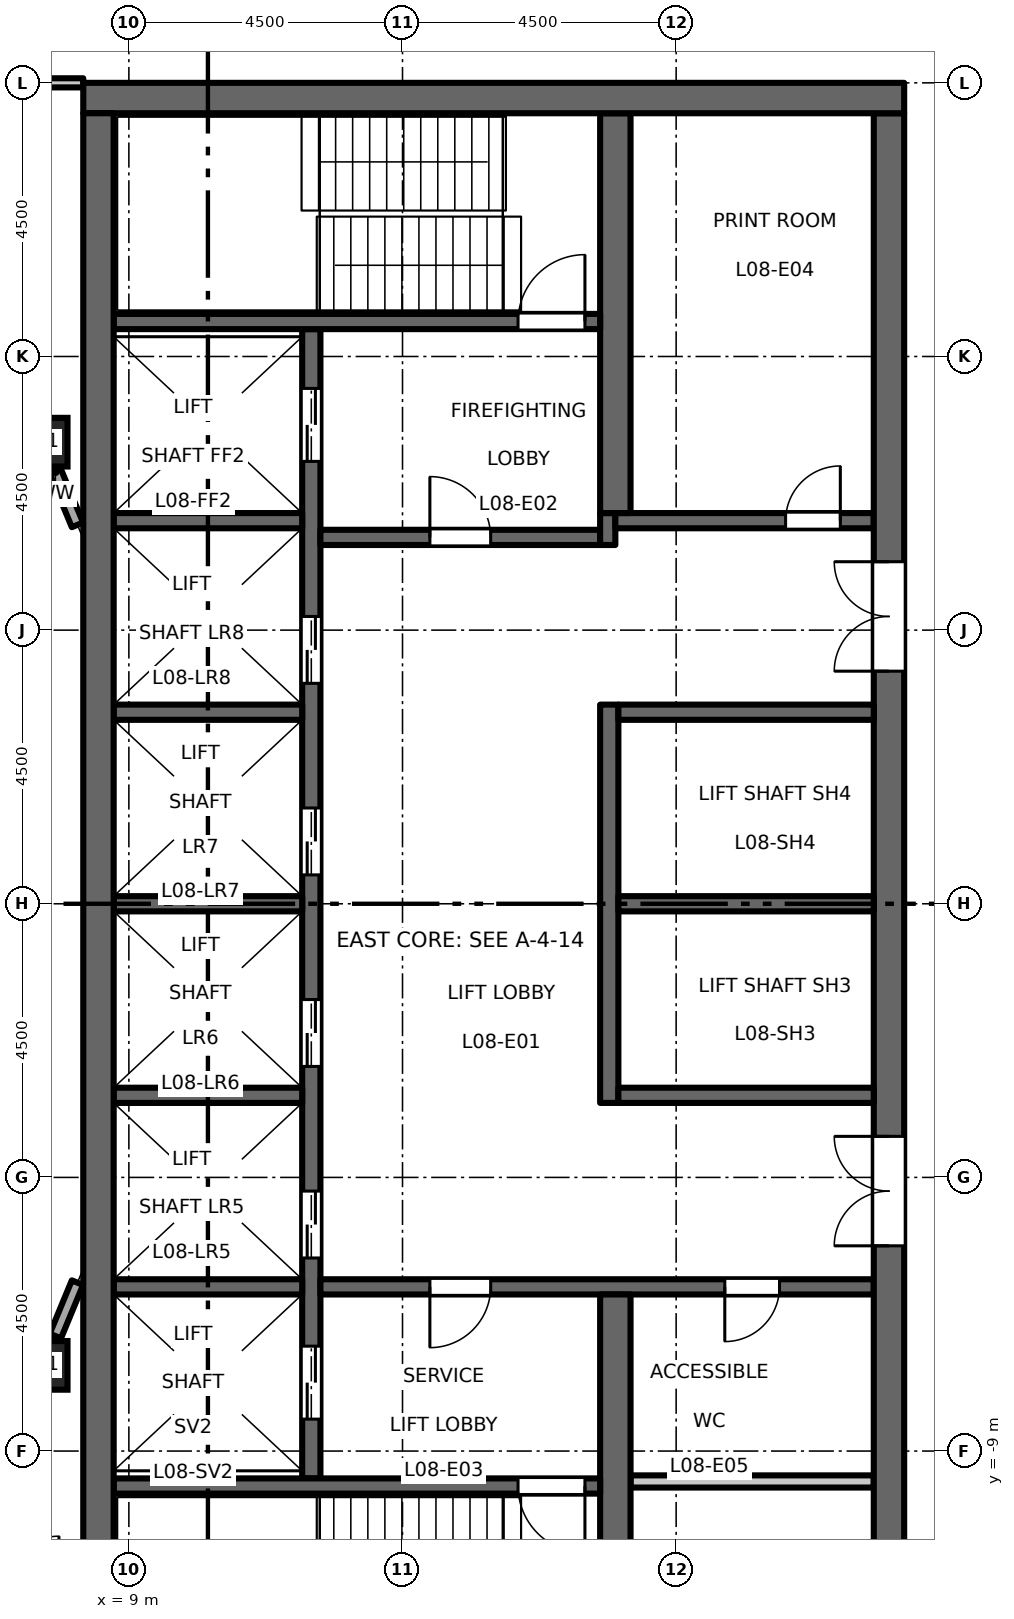
"""IFC4 building model, lengths in metres.
Left out: names, types, materials, properties, quantities, classifications, styles, units other than length and angle.
Written with IfcOpenShell. Run it as: python <this file> out.ifc"""

import sys

from ifc_helpers import new_model, si_unit, direction, frame, frame_2d, origin, origin_2d, place, context, subcontext, project, spatial, rectangle, hollow_rectangle, extrude, element, fill, save


model = new_model("IFC4")
c1 = context("Model", 3, precision=1e-05, world=origin(), true_north=direction((0.0, 1.0)))
c2 = subcontext(c1, "Body", "Model", "MODEL_VIEW")
j1 = project(units=[si_unit("LENGTHUNIT", "METRE"), si_unit("PLANEANGLEUNIT", "RADIAN")], contexts=[c1])
p1 = place(None, origin())
s1 = spatial("IfcSite", under=j1, at=p1, CompositionType="ELEMENT")
p2 = place(p1, origin())
s2 = spatial("IfcBuilding", under=s1, at=p2, CompositionType="ELEMENT")
p3 = place(p2, frame((0.0, 0.0, 40.2)))
s3 = spatial("IfcBuildingStorey", under=s2, at=p3, CompositionType="ELEMENT", Elevation=40.2)
for number, where, z_axis, x_axis in (
    (1, (7.591, -7.591, 0.0), (0.0, 0.0, 1.0), (1.0, 0.0, 0.0)),
    (2, (7.591, 7.591, 0.0), (0.0, 0.0, 1.0), (1.0, 0.0, 0.0)),
):
    element("IfcColumn", number, at=place(p3, frame(where, z_axis=z_axis, x_axis=x_axis)), inside=s3, PredefinedType="COLUMN", context=c2, shape_type="SweptSolid", body=[
        extrude(hollow_rectangle(XDim=0.8, YDim=0.8, WallThickness=0.05, at=origin_2d()), origin(), (0.0, 0.0, 1.0), 4.5),
    ])
p4 = place(p3, frame((12.0, -9.45, 0.0), z_axis=(0.0, 0.0, 1.0), x_axis=(0.0, 1.0, 0.0)))
e3 = element("IfcWall", 3, at=p4, inside=s3, PredefinedType="SHEAR", context=c2, shape_type="SweptSolid", body=[
    extrude(rectangle(XDim=18.9, YDim=0.3, at=frame_2d((9.45, 0.0))), origin(), (0.0, 0.0, 1.0), 4.35),
])
p5 = place(p4, frame((3.625, 0.0, 0.0)))
e4 = element("IfcOpeningElement", 4, at=p5, cuts=e3, PredefinedType="OPENING", context=c2, shape_type="SweptSolid", body=[
    extrude(rectangle(XDim=1.1, YDim=2.1, at=frame_2d((0.55, 1.05))), frame((0.0, 0.16, 0.0), z_axis=(0.0, -1.0, 0.0), x_axis=(1.0, 0.0, 0.0)), (0.0, 0.0, 1.0), 0.32),
])
p6 = place(p4, frame((6.775, 0.0, 0.0)))
e5 = element("IfcOpeningElement", 5, at=p6, cuts=e3, PredefinedType="OPENING", context=c2, shape_type="SweptSolid", body=[
    extrude(rectangle(XDim=1.1, YDim=2.1, at=frame_2d((0.55, 1.05))), frame((0.0, 0.16, 0.0), z_axis=(0.0, -1.0, 0.0), x_axis=(1.0, 0.0, 0.0)), (0.0, 0.0, 1.0), 0.32),
])
p7 = place(p4, frame((9.925, 0.0, 0.0)))
e6 = element("IfcOpeningElement", 6, at=p7, cuts=e3, PredefinedType="OPENING", context=c2, shape_type="SweptSolid", body=[
    extrude(rectangle(XDim=1.1, YDim=2.1, at=frame_2d((0.55, 1.05))), frame((0.0, 0.16, 0.0), z_axis=(0.0, -1.0, 0.0), x_axis=(1.0, 0.0, 0.0)), (0.0, 0.0, 1.0), 0.32),
])
p8 = place(p4, frame((13.075, 0.0, 0.0)))
e7 = element("IfcOpeningElement", 7, at=p8, cuts=e3, PredefinedType="OPENING", context=c2, shape_type="SweptSolid", body=[
    extrude(rectangle(XDim=1.1, YDim=2.1, at=frame_2d((0.55, 1.05))), frame((0.0, 0.16, 0.0), z_axis=(0.0, -1.0, 0.0), x_axis=(1.0, 0.0, 0.0)), (0.0, 0.0, 1.0), 0.32),
])
p9 = place(p4, frame((16.725, 0.0, 0.0)))
e8 = element("IfcOpeningElement", 8, at=p9, cuts=e3, PredefinedType="OPENING", context=c2, shape_type="SweptSolid", body=[
    extrude(rectangle(XDim=1.2, YDim=2.1, at=frame_2d((0.6, 1.05))), frame((0.0, 0.16, 0.0), z_axis=(0.0, -1.0, 0.0), x_axis=(1.0, 0.0, 0.0)), (0.0, 0.0, 1.0), 0.32),
])
p10 = place(p4, frame((0.975, 0.0, 0.0)))
e9 = element("IfcOpeningElement", 9, at=p10, cuts=e3, PredefinedType="OPENING", context=c2, shape_type="SweptSolid", body=[
    extrude(rectangle(XDim=1.2, YDim=2.1, at=frame_2d((0.6, 1.05))), frame((0.0, 0.16, 0.0), z_axis=(0.0, -1.0, 0.0), x_axis=(1.0, 0.0, 0.0)), (0.0, 0.0, 1.0), 0.32),
])
p11 = place(p3, frame((12.15, 6.025, 0.0), z_axis=(0.0, 0.0, 1.0), x_axis=(1.0, 0.0, 0.0)))
e10 = element("IfcWall", 10, at=p11, inside=s3, PredefinedType="SHEAR", context=c2, shape_type="SweptSolid", body=[
    extrude(rectangle(XDim=4.6, YDim=0.25, at=frame_2d((2.3, 0.0))), origin(), (0.0, 0.0, 1.0), 4.35),
])
p12 = place(p11, frame((1.8, 0.0, 0.0)))
e11 = element("IfcOpeningElement", 11, at=p12, cuts=e10, PredefinedType="OPENING", context=c2, shape_type="SweptSolid", body=[
    extrude(rectangle(XDim=1.0, YDim=2.1, at=frame_2d((0.5, 1.05))), frame((0.0, 0.135, 0.0), z_axis=(0.0, -1.0, 0.0), x_axis=(1.0, 0.0, 0.0)), (0.0, 0.0, 1.0), 0.27),
])
p13 = place(p3, frame((16.875, 5.9, 0.0), z_axis=(0.0, 0.0, 1.0), x_axis=(0.0, 1.0, 0.0)))
e12 = element("IfcWall", 12, at=p13, inside=s3, PredefinedType="SHEAR", context=c2, shape_type="SweptSolid", body=[
    extrude(rectangle(XDim=0.525, YDim=0.25, at=frame_2d((0.263, 0.0))), origin(), (0.0, 0.0, 1.0), 4.35),
])
p14 = place(p3, frame((17.0, 6.3, 0.0), z_axis=(0.0, 0.0, 1.0), x_axis=(1.0, 0.0, 0.0)))
e13 = element("IfcWall", 13, at=p14, inside=s3, PredefinedType="SHEAR", context=c2, shape_type="SweptSolid", body=[
    extrude(rectangle(XDim=4.25, YDim=0.25, at=frame_2d((2.125, 0.0))), origin(), (0.0, 0.0, 1.0), 4.35),
])
p15 = place(p14, frame((2.8, 0.0, 0.0)))
e14 = element("IfcOpeningElement", 14, at=p15, cuts=e13, PredefinedType="OPENING", context=c2, shape_type="SweptSolid", body=[
    extrude(rectangle(XDim=0.9, YDim=2.1, at=frame_2d((0.45, 1.05))), frame((0.0, 0.135, 0.0), z_axis=(0.0, -1.0, 0.0), x_axis=(1.0, 0.0, 0.0)), (0.0, 0.0, 1.0), 0.27),
])
p16 = place(p3, frame((12.15, -6.3, 0.0), z_axis=(0.0, 0.0, 1.0), x_axis=(1.0, 0.0, 0.0)))
e15 = element("IfcWall", 15, at=p16, inside=s3, PredefinedType="SHEAR", context=c2, shape_type="SweptSolid", body=[
    extrude(rectangle(XDim=9.1, YDim=0.25, at=frame_2d((4.55, 0.0))), origin(), (0.0, 0.0, 1.0), 4.35),
])
p17 = place(p16, frame((1.8, 0.0, 0.0)))
e16 = element("IfcOpeningElement", 16, at=p17, cuts=e15, PredefinedType="OPENING", context=c2, shape_type="SweptSolid", body=[
    extrude(rectangle(XDim=1.0, YDim=2.1, at=frame_2d((0.5, 1.05))), frame((0.0, 0.135, 0.0), z_axis=(0.0, -1.0, 0.0), x_axis=(1.0, 0.0, 0.0)), (0.0, 0.0, 1.0), 0.27),
])
p18 = place(p16, frame((6.65, 0.0, 0.0)))
e17 = element("IfcOpeningElement", 17, at=p18, cuts=e15, PredefinedType="OPENING", context=c2, shape_type="SweptSolid", body=[
    extrude(rectangle(XDim=0.9, YDim=2.1, at=frame_2d((0.45, 1.05))), frame((0.0, 0.135, 0.0), z_axis=(0.0, -1.0, 0.0), x_axis=(1.0, 0.0, 0.0)), (0.0, 0.0, 1.0), 0.27),
])
p19 = place(p3, frame((21.5, -13.0, 0.0), z_axis=(0.0, 0.0, 1.0), x_axis=(0.0, 1.0, 0.0)))
e18 = element("IfcWall", 18, at=p19, inside=s3, PredefinedType="SHEAR", context=c2, shape_type="SweptSolid", body=[
    extrude(rectangle(XDim=26.0, YDim=0.5, at=frame_2d((13.0, 0.0))), origin(), (0.0, 0.0, 1.0), 4.35),
])
p20 = place(p19, frame((16.825, 0.0, 0.0)))
e19 = element("IfcOpeningElement", 19, at=p20, cuts=e18, PredefinedType="OPENING", context=c2, shape_type="SweptSolid", body=[
    extrude(rectangle(XDim=1.8, YDim=2.1, at=frame_2d((0.9, 1.05))), frame((0.0, 0.26, 0.0), z_axis=(0.0, -1.0, 0.0), x_axis=(1.0, 0.0, 0.0)), (0.0, 0.0, 1.0), 0.52),
])
p21 = place(p19, frame((7.375, 0.0, 0.0)))
e20 = element("IfcOpeningElement", 20, at=p21, cuts=e18, PredefinedType="OPENING", context=c2, shape_type="SweptSolid", body=[
    extrude(rectangle(XDim=1.8, YDim=2.1, at=frame_2d((0.9, 1.05))), frame((0.0, 0.26, 0.0), z_axis=(0.0, -1.0, 0.0), x_axis=(1.0, 0.0, 0.0)), (0.0, 0.0, 1.0), 0.52),
])
p22 = place(p19, frame((1.3, 0.0, 0.0)))
e21 = element("IfcOpeningElement", 21, at=p22, cuts=e18, PredefinedType="OPENING", context=c2, shape_type="SweptSolid", body=[
    extrude(rectangle(XDim=0.9, YDim=2.1, at=frame_2d((0.45, 1.05))), frame((0.0, 0.26, 0.0), z_axis=(0.0, -1.0, 0.0), x_axis=(1.0, 0.0, 0.0)), (0.0, 0.0, 1.0), 0.52),
])
p23 = place(p3, frame((17.25, -9.5, 0.0), z_axis=(0.0, 0.0, 1.0), x_axis=(1.0, 0.0, 0.0)))
e22 = element("IfcWall", 22, at=p23, inside=s3, PredefinedType="PARTITIONING", context=c2, shape_type="SweptSolid", body=[
    extrude(rectangle(XDim=4.0, YDim=0.2, at=frame_2d((2.0, 0.0))), origin(), (0.0, 0.0, 1.0), 4.35),
])
p24 = place(p3, frame((16.9, -3.275, 0.0), z_axis=(0.0, 0.0, 1.0), x_axis=(0.0, 1.0, 0.0)))
e23 = element("IfcWall", 23, at=p24, inside=s3, PredefinedType="SHEAR", context=c2, shape_type="SweptSolid", body=[
    extrude(rectangle(XDim=6.55, YDim=0.3, at=frame_2d((3.275, 0.0))), origin(), (0.0, 0.0, 1.0), 4.35),
])
for number, where, z_axis, x_axis in (
    (24, (17.05, 0.0, 0.0), (0.0, 0.0, 1.0), (1.0, 0.0, 0.0)),
    (25, (17.05, 3.15, 0.0), (0.0, 0.0, 1.0), (1.0, 0.0, 0.0)),
    (26, (17.05, -3.15, 0.0), (0.0, 0.0, 1.0), (1.0, 0.0, 0.0)),
):
    element("IfcWall", number, at=place(p3, frame(where, z_axis=z_axis, x_axis=x_axis)), inside=s3, PredefinedType="SHEAR", context=c2, shape_type="SweptSolid", body=[
        extrude(rectangle(XDim=4.2, YDim=0.25, at=frame_2d((2.1, 0.0))), origin(), (0.0, 0.0, 1.0), 4.35),
    ])
for number, where, z_axis, x_axis in (
    (27, (17.0, 6.425, 0.0), (0.0, 0.0, 1.0), (0.0, 1.0, 0.0)),
    (28, (17.0, -13.0, 0.0), (0.0, 0.0, 1.0), (0.0, 1.0, 0.0)),
):
    element("IfcWall", number, at=place(p3, frame(where, z_axis=z_axis, x_axis=x_axis)), inside=s3, PredefinedType="SHEAR", context=c2, shape_type="SweptSolid", body=[
        extrude(rectangle(XDim=6.575, YDim=0.5, at=frame_2d((3.288, 0.0))), origin(), (0.0, 0.0, 1.0), 4.35),
    ])
for number, where, z_axis, x_axis in (
    (29, (8.75, 0.0, 0.0), (0.0, 0.0, 1.0), (1.0, 0.0, 0.0)),
    (30, (8.75, 3.15, 0.0), (0.0, 0.0, 1.0), (1.0, 0.0, 0.0)),
    (31, (8.75, 6.3, 0.0), (0.0, 0.0, 1.0), (1.0, 0.0, 0.0)),
    (32, (8.75, -3.15, 0.0), (0.0, 0.0, 1.0), (1.0, 0.0, 0.0)),
    (33, (8.75, -6.3, 0.0), (0.0, 0.0, 1.0), (1.0, 0.0, 0.0)),
):
    element("IfcWall", number, at=place(p3, frame(where, z_axis=z_axis, x_axis=x_axis)), inside=s3, PredefinedType="SHEAR", context=c2, shape_type="SweptSolid", body=[
        extrude(rectangle(XDim=3.1, YDim=0.25, at=frame_2d((1.55, 0.0))), origin(), (0.0, 0.0, 1.0), 4.35),
    ])
p25 = place(p3, frame((8.75, 9.575, 0.0), z_axis=(0.0, 0.0, 1.0), x_axis=(1.0, 0.0, 0.0)))
e34 = element("IfcWall", 34, at=p25, inside=s3, PredefinedType="SHEAR", context=c2, shape_type="SweptSolid", body=[
    extrude(rectangle(XDim=8.0, YDim=0.25, at=frame_2d((4.0, 0.0))), origin(), (0.0, 0.0, 1.0), 4.35),
])
p26 = place(p25, frame((6.65, 0.0, 0.0)))
e35 = element("IfcOpeningElement", 35, at=p26, cuts=e34, PredefinedType="OPENING", context=c2, shape_type="SweptSolid", body=[
    extrude(rectangle(XDim=1.1, YDim=2.1, at=frame_2d((0.55, 1.05))), frame((0.0, 0.135, 0.0), z_axis=(0.0, -1.0, 0.0), x_axis=(1.0, 0.0, 0.0)), (0.0, 0.0, 1.0), 0.27),
])
p27 = place(p3, frame((8.75, -9.575, 0.0), z_axis=(0.0, 0.0, 1.0), x_axis=(1.0, 0.0, 0.0)))
e36 = element("IfcWall", 36, at=p27, inside=s3, PredefinedType="SHEAR", context=c2, shape_type="SweptSolid", body=[
    extrude(rectangle(XDim=8.0, YDim=0.25, at=frame_2d((4.0, 0.0))), origin(), (0.0, 0.0, 1.0), 4.35),
])
p28 = place(p27, frame((6.65, 0.0, 0.0)))
e37 = element("IfcOpeningElement", 37, at=p28, cuts=e36, PredefinedType="OPENING", context=c2, shape_type="SweptSolid", body=[
    extrude(rectangle(XDim=1.1, YDim=2.1, at=frame_2d((0.55, 1.05))), frame((0.0, 0.135, 0.0), z_axis=(0.0, -1.0, 0.0), x_axis=(1.0, 0.0, 0.0)), (0.0, 0.0, 1.0), 0.27),
])
p29 = place(p3, frame((8.25, 13.25, 0.0), z_axis=(0.0, 0.0, 1.0), x_axis=(1.0, 0.0, 0.0)))
e38 = element("IfcWall", 38, at=p29, inside=s3, PredefinedType="SHEAR", context=c2, shape_type="SweptSolid", body=[
    extrude(rectangle(XDim=13.5, YDim=0.5, at=frame_2d((6.75, 0.0))), origin(), (0.0, 0.0, 1.0), 4.35),
])
p30 = place(p3, frame((8.5, -13.0, 0.0), z_axis=(0.0, 0.0, 1.0), x_axis=(0.0, 1.0, 0.0)))
e39 = element("IfcWall", 39, at=p30, inside=s3, PredefinedType="SHEAR", context=c2, shape_type="SweptSolid", body=[
    extrude(rectangle(XDim=26.0, YDim=0.5, at=frame_2d((13.0, 0.0))), origin(), (0.0, 0.0, 1.0), 4.35),
])
for number, where, z_axis, x_axis in (
    (40, (7.791, -7.108, 0.0), (0.0, 0.0, 1.0), (0.383, 0.924, 0.0)),
    (41, (8.154, 6.231, 0.0), (0.0, 0.0, 1.0), (-0.383, 0.924, 0.0)),
):
    element("IfcWall", number, at=place(p3, frame(where, z_axis=z_axis, x_axis=x_axis)), inside=s3, PredefinedType="STANDARD", context=c2, shape_type="SweptSolid", body=[
        extrude(rectangle(XDim=0.949, YDim=0.2, at=frame_2d((0.475, 0.0))), origin(), (0.0, 0.0, 1.0), 3.73),
    ])
p31 = place(p3, frame((-8.25, 13.5, 0.0), z_axis=(0.0, 0.0, 1.0), x_axis=(1.0, 0.0, 0.0)))
e42 = element("IfcWall", 42, at=p31, inside=s3, PredefinedType="PARTITIONING", context=c2, shape_type="SweptSolid", body=[
    extrude(rectangle(XDim=16.5, YDim=0.15, at=frame_2d((8.25, 0.0))), origin(), (0.0, 0.0, 1.0), 3.85),
])
p32 = place(p31, frame((0.65, 0.0, 0.0)))
e43 = element("IfcOpeningElement", 43, at=p32, cuts=e42, PredefinedType="OPENING", context=c2, shape_type="SweptSolid", body=[
    extrude(rectangle(XDim=1.0, YDim=2.1, at=frame_2d((0.5, 1.05))), frame((0.0, 0.085, 0.0), z_axis=(0.0, -1.0, 0.0), x_axis=(1.0, 0.0, 0.0)), (0.0, 0.0, 1.0), 0.17),
])
p33 = place(p12, origin())
e44 = element("IfcDoor", 44, at=p33, inside=s3, OperationType="SINGLE_SWING_RIGHT", PredefinedType="DOOR", context=c2, shape_type="SweptSolid", body=[
    extrude(rectangle(XDim=1.0, YDim=2.1, at=frame_2d((0.5, 1.05))), frame((0.0, 0.025, 0.0), z_axis=(0.0, -1.0, 0.0), x_axis=(1.0, 0.0, 0.0)), (0.0, 0.0, 1.0), 0.05),
])
fill(e11, e44)
p34 = place(p17, origin())
e45 = element("IfcDoor", 45, at=p34, inside=s3, OperationType="SINGLE_SWING_LEFT", PredefinedType="DOOR", context=c2, shape_type="SweptSolid", body=[
    extrude(rectangle(XDim=1.0, YDim=2.1, at=frame_2d((0.5, 1.05))), frame((0.0, 0.025, 0.0), z_axis=(0.0, -1.0, 0.0), x_axis=(1.0, 0.0, 0.0)), (0.0, 0.0, 1.0), 0.05),
])
fill(e16, e45)
p35 = place(p26, origin())
e46 = element("IfcDoor", 46, at=p35, inside=s3, OperationType="SINGLE_SWING_LEFT", PredefinedType="DOOR", context=c2, shape_type="SweptSolid", body=[
    extrude(rectangle(XDim=1.1, YDim=2.1, at=frame_2d((0.55, 1.05))), frame((0.0, 0.025, 0.0), z_axis=(0.0, -1.0, 0.0), x_axis=(1.0, 0.0, 0.0)), (0.0, 0.0, 1.0), 0.05),
])
fill(e35, e46)
p36 = place(p28, origin())
e47 = element("IfcDoor", 47, at=p36, inside=s3, OperationType="SINGLE_SWING_RIGHT", PredefinedType="DOOR", context=c2, shape_type="SweptSolid", body=[
    extrude(rectangle(XDim=1.1, YDim=2.1, at=frame_2d((0.55, 1.05))), frame((0.0, 0.025, 0.0), z_axis=(0.0, -1.0, 0.0), x_axis=(1.0, 0.0, 0.0)), (0.0, 0.0, 1.0), 0.05),
])
fill(e37, e47)
p37 = place(p20, origin())
e48 = element("IfcDoor", 48, at=p37, inside=s3, OperationType="DOUBLE_DOOR_DOUBLE_SWING", PredefinedType="DOOR", context=c2, shape_type="SweptSolid", body=[
    extrude(rectangle(XDim=1.8, YDim=2.1, at=frame_2d((0.9, 1.05))), frame((0.0, 0.025, 0.0), z_axis=(0.0, -1.0, 0.0), x_axis=(1.0, 0.0, 0.0)), (0.0, 0.0, 1.0), 0.05),
])
fill(e19, e48)
p38 = place(p21, origin())
e49 = element("IfcDoor", 49, at=p38, inside=s3, OperationType="DOUBLE_DOOR_DOUBLE_SWING", PredefinedType="DOOR", context=c2, shape_type="SweptSolid", body=[
    extrude(rectangle(XDim=1.8, YDim=2.1, at=frame_2d((0.9, 1.05))), frame((0.0, 0.025, 0.0), z_axis=(0.0, -1.0, 0.0), x_axis=(1.0, 0.0, 0.0)), (0.0, 0.0, 1.0), 0.05),
])
fill(e20, e49)
p39 = place(p5, origin())
e50 = element("IfcDoor", 50, at=p39, inside=s3, OperationType="DOUBLE_DOOR_SLIDING", PredefinedType="DOOR", context=c2, shape_type="SweptSolid", body=[
    extrude(rectangle(XDim=1.1, YDim=2.1, at=frame_2d((0.55, 1.05))), frame((0.0, 0.025, 0.0), z_axis=(0.0, -1.0, 0.0), x_axis=(1.0, 0.0, 0.0)), (0.0, 0.0, 1.0), 0.05),
])
fill(e4, e50)
p40 = place(p6, origin())
e51 = element("IfcDoor", 51, at=p40, inside=s3, OperationType="DOUBLE_DOOR_SLIDING", PredefinedType="DOOR", context=c2, shape_type="SweptSolid", body=[
    extrude(rectangle(XDim=1.1, YDim=2.1, at=frame_2d((0.55, 1.05))), frame((0.0, 0.025, 0.0), z_axis=(0.0, -1.0, 0.0), x_axis=(1.0, 0.0, 0.0)), (0.0, 0.0, 1.0), 0.05),
])
fill(e5, e51)
p41 = place(p7, origin())
e52 = element("IfcDoor", 52, at=p41, inside=s3, OperationType="DOUBLE_DOOR_SLIDING", PredefinedType="DOOR", context=c2, shape_type="SweptSolid", body=[
    extrude(rectangle(XDim=1.1, YDim=2.1, at=frame_2d((0.55, 1.05))), frame((0.0, 0.025, 0.0), z_axis=(0.0, -1.0, 0.0), x_axis=(1.0, 0.0, 0.0)), (0.0, 0.0, 1.0), 0.05),
])
fill(e6, e52)
p42 = place(p8, origin())
e53 = element("IfcDoor", 53, at=p42, inside=s3, OperationType="DOUBLE_DOOR_SLIDING", PredefinedType="DOOR", context=c2, shape_type="SweptSolid", body=[
    extrude(rectangle(XDim=1.1, YDim=2.1, at=frame_2d((0.55, 1.05))), frame((0.0, 0.025, 0.0), z_axis=(0.0, -1.0, 0.0), x_axis=(1.0, 0.0, 0.0)), (0.0, 0.0, 1.0), 0.05),
])
fill(e7, e53)
p43 = place(p9, origin())
e54 = element("IfcDoor", 54, at=p43, inside=s3, OperationType="DOUBLE_DOOR_SLIDING", PredefinedType="DOOR", context=c2, shape_type="SweptSolid", body=[
    extrude(rectangle(XDim=1.2, YDim=2.1, at=frame_2d((0.6, 1.05))), frame((0.0, 0.025, 0.0), z_axis=(0.0, -1.0, 0.0), x_axis=(1.0, 0.0, 0.0)), (0.0, 0.0, 1.0), 0.05),
])
fill(e8, e54)
p44 = place(p10, origin())
e55 = element("IfcDoor", 55, at=p44, inside=s3, OperationType="DOUBLE_DOOR_SLIDING", PredefinedType="DOOR", context=c2, shape_type="SweptSolid", body=[
    extrude(rectangle(XDim=1.2, YDim=2.1, at=frame_2d((0.6, 1.05))), frame((0.0, 0.025, 0.0), z_axis=(0.0, -1.0, 0.0), x_axis=(1.0, 0.0, 0.0)), (0.0, 0.0, 1.0), 0.05),
])
fill(e9, e55)
p45 = place(p15, origin())
e56 = element("IfcDoor", 56, at=p45, inside=s3, OperationType="SINGLE_SWING_LEFT", PredefinedType="DOOR", context=c2, shape_type="SweptSolid", body=[
    extrude(rectangle(XDim=0.9, YDim=2.1, at=frame_2d((0.45, 1.05))), frame((0.0, 0.025, 0.0), z_axis=(0.0, -1.0, 0.0), x_axis=(1.0, 0.0, 0.0)), (0.0, 0.0, 1.0), 0.05),
])
fill(e14, e56)
p46 = place(p18, origin())
e57 = element("IfcDoor", 57, at=p46, inside=s3, OperationType="SINGLE_SWING_LEFT", PredefinedType="DOOR", context=c2, shape_type="SweptSolid", body=[
    extrude(rectangle(XDim=0.9, YDim=2.1, at=frame_2d((0.45, 1.05))), frame((0.0, 0.025, 0.0), z_axis=(0.0, -1.0, 0.0), x_axis=(1.0, 0.0, 0.0)), (0.0, 0.0, 1.0), 0.05),
])
fill(e17, e57)
save(model, sys.argv[1])
